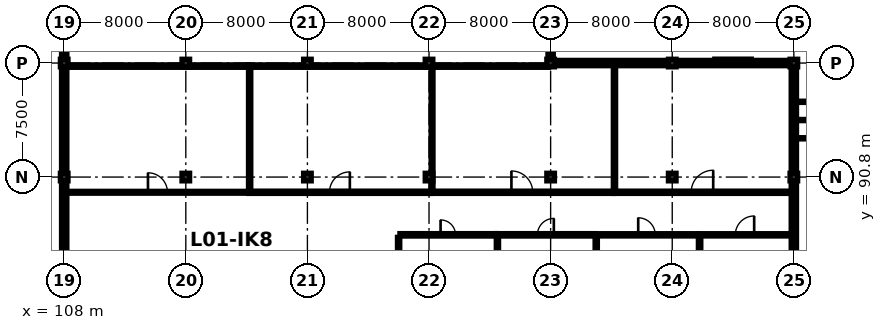
"""IFC4 building model, lengths in metres.
Left out: names, types, materials, properties, quantities, classifications, styles, units other than length and angle.
Written with IfcOpenShell. Run it as: python <this file> out.ifc"""

import sys

from ifc_helpers import new_model, si_unit, direction, frame, frame_2d, origin, origin_2d, place, context, subcontext, project, spatial, rectangle, extrude, element, fill, save


model = new_model("IFC4")
c1 = context("Model", 3, precision=1e-05, world=origin(), true_north=direction((0.0, 1.0)))
c2 = subcontext(c1, "Body", "Model", "MODEL_VIEW")
j1 = project(units=[si_unit("LENGTHUNIT", "METRE"), si_unit("PLANEANGLEUNIT", "RADIAN")], contexts=[c1])
p1 = place(None, origin())
s1 = spatial("IfcSite", under=j1, at=p1, CompositionType="ELEMENT")
p2 = place(p1, origin())
s2 = spatial("IfcBuilding", under=s1, at=p2, CompositionType="ELEMENT")
p3 = place(p2, frame((0.0, 0.0, 5.0)))
s3 = spatial("IfcBuildingStorey", under=s2, at=p3, CompositionType="ELEMENT", Elevation=5.0)
for number, where, z_axis, x_axis in (
    (1, (108.0, 90.8, 0.0), (0.0, 0.0, 1.0), (1.0, 0.0, 0.0)),
    (2, (108.0, 98.3, 0.0), (0.0, 0.0, 1.0), (1.0, 0.0, 0.0)),
    (3, (116.0, 90.8, 0.0), (0.0, 0.0, 1.0), (1.0, 0.0, 0.0)),
    (4, (116.0, 98.3, 0.0), (0.0, 0.0, 1.0), (1.0, 0.0, 0.0)),
    (5, (124.0, 90.8, 0.0), (0.0, 0.0, 1.0), (1.0, 0.0, 0.0)),
    (6, (124.0, 98.3, 0.0), (0.0, 0.0, 1.0), (1.0, 0.0, 0.0)),
    (7, (132.0, 90.8, 0.0), (0.0, 0.0, 1.0), (1.0, 0.0, 0.0)),
    (8, (132.0, 98.3, 0.0), (0.0, 0.0, 1.0), (1.0, 0.0, 0.0)),
    (9, (140.0, 90.8, 0.0), (0.0, 0.0, 1.0), (1.0, 0.0, 0.0)),
    (10, (140.0, 98.3, 0.0), (0.0, 0.0, 1.0), (1.0, 0.0, 0.0)),
    (11, (148.0, 90.8, 0.0), (0.0, 0.0, 1.0), (1.0, 0.0, 0.0)),
    (12, (148.0, 98.3, 0.0), (0.0, 0.0, 1.0), (1.0, 0.0, 0.0)),
    (13, (156.0, 90.8, 0.0), (0.0, 0.0, 1.0), (1.0, 0.0, 0.0)),
    (14, (156.0, 98.3, 0.0), (0.0, 0.0, 1.0), (1.0, 0.0, 0.0)),
):
    element("IfcColumn", number, at=place(p3, frame(where, z_axis=z_axis, x_axis=x_axis)), inside=s3, PredefinedType="COLUMN", context=c2, shape_type="SweptSolid", body=[
        extrude(rectangle(XDim=0.5, YDim=0.5, at=origin_2d()), origin(), (0.0, 0.0, 1.0), 5.5),
    ])
for number, where, z_axis, x_axis in (
    (15, (108.0, 83.55, 0.0), (0.0, 0.0, 1.0), (0.0, 1.0, 0.0)),
    (16, (108.0, 91.05, 0.0), (0.0, 0.0, 1.0), (0.0, 1.0, 0.0)),
):
    element("IfcWall", number, at=place(p3, frame(where, z_axis=z_axis, x_axis=x_axis)), inside=s3, PredefinedType="SOLIDWALL", context=c2, shape_type="SweptSolid", body=[
        extrude(rectangle(XDim=7.0, YDim=0.35, at=frame_2d((3.5, 0.0))), origin(), (0.0, 0.0, 1.0), 4.2),
    ])
p4 = place(p3, frame((108.0, 98.55, 0.0), z_axis=(0.0, 0.0, 1.0), x_axis=(0.0, 1.0, 0.0)))
e17 = element("IfcWall", 17, at=p4, inside=s3, PredefinedType="SOLIDWALL", context=c2, shape_type="SweptSolid", body=[
    extrude(rectangle(XDim=7.0, YDim=0.35, at=frame_2d((3.5, 0.0))), origin(), (0.0, 0.0, 1.0), 4.2),
])
p5 = place(p4, frame((2.6, 0.0, 0.9)))
e18 = element("IfcOpeningElement", 18, at=p5, cuts=e17, PredefinedType="OPENING", context=c2, shape_type="SweptSolid", body=[
    extrude(rectangle(XDim=1.8, YDim=1.3, at=frame_2d((0.9, 0.65))), frame((0.0, 0.187, 0.0), z_axis=(0.0, -1.0, 0.0), x_axis=(1.0, 0.0, 0.0)), (0.0, 0.0, 1.0), 0.374),
])
p6 = place(p3, frame((140.0, 105.55, 0.0), z_axis=(0.0, 0.0, 1.0), x_axis=(0.0, -1.0, 0.0)))
e19 = element("IfcWall", 19, at=p6, inside=s3, PredefinedType="SOLIDWALL", context=c2, shape_type="SweptSolid", body=[
    extrude(rectangle(XDim=7.0, YDim=0.35, at=frame_2d((3.5, 0.0))), origin(), (0.0, 0.0, 1.0), 3.655),
])
p7 = place(p6, frame((2.5, 0.0, 0.9)))
e20 = element("IfcOpeningElement", 20, at=p7, cuts=e19, PredefinedType="OPENING", context=c2, shape_type="SweptSolid", body=[
    extrude(rectangle(XDim=2.0, YDim=1.5, at=frame_2d((1.0, 0.75))), frame((0.0, 0.187, 0.0), z_axis=(0.0, -1.0, 0.0), x_axis=(1.0, 0.0, 0.0)), (0.0, 0.0, 1.0), 0.374),
])
p8 = place(p3, frame((140.25, 98.3, 0.0), z_axis=(0.0, 0.0, 1.0), x_axis=(1.0, 0.0, 0.0)))
e21 = element("IfcWall", 21, at=p8, inside=s3, PredefinedType="SOLIDWALL", context=c2, shape_type="SweptSolid", body=[
    extrude(rectangle(XDim=7.5, YDim=0.35, at=frame_2d((3.75, 0.0))), origin(), (0.0, 0.0, 1.0), 3.655),
])
p9 = place(p3, frame((148.25, 98.3, 0.0), z_axis=(0.0, 0.0, 1.0), x_axis=(1.0, 0.0, 0.0)))
e22 = element("IfcWall", 22, at=p9, inside=s3, PredefinedType="SOLIDWALL", context=c2, shape_type="SweptSolid", body=[
    extrude(rectangle(XDim=7.5, YDim=0.35, at=frame_2d((3.75, 0.0))), origin(), (0.0, 0.0, 1.0), 4.2),
])
p10 = place(p9, frame((2.75, 0.0, 0.9)))
e23 = element("IfcOpeningElement", 23, at=p10, cuts=e22, PredefinedType="OPENING", context=c2, shape_type="SweptSolid", body=[
    extrude(rectangle(XDim=2.0, YDim=1.7, at=frame_2d((1.0, 0.85))), frame((0.0, 0.187, 0.0), z_axis=(0.0, -1.0, 0.0), x_axis=(1.0, 0.0, 0.0)), (0.0, 0.0, 1.0), 0.374),
])
p11 = place(p3, frame((156.0, 98.05, 0.0), z_axis=(0.0, 0.0, 1.0), x_axis=(0.0, -1.0, 0.0)))
e24 = element("IfcWall", 24, at=p11, inside=s3, PredefinedType="SOLIDWALL", context=c2, shape_type="SweptSolid", body=[
    extrude(rectangle(XDim=7.0, YDim=0.35, at=frame_2d((3.5, 0.0))), origin(), (0.0, 0.0, 1.0), 4.2),
])
p12 = place(p11, frame((2.5, 0.0, 0.9)))
e25 = element("IfcOpeningElement", 25, at=p12, cuts=e24, PredefinedType="OPENING", context=c2, shape_type="SweptSolid", body=[
    extrude(rectangle(XDim=2.0, YDim=1.9, at=frame_2d((1.0, 0.95))), frame((0.0, 0.187, 0.0), z_axis=(0.0, -1.0, 0.0), x_axis=(1.0, 0.0, 0.0)), (0.0, 0.0, 1.0), 0.374),
])
p13 = place(p3, frame((156.0, 90.55, 0.0), z_axis=(0.0, 0.0, 1.0), x_axis=(0.0, -1.0, 0.0)))
e26 = element("IfcWall", 26, at=p13, inside=s3, PredefinedType="SOLIDWALL", context=c2, shape_type="SweptSolid", body=[
    extrude(rectangle(XDim=7.0, YDim=0.35, at=frame_2d((3.5, 0.0))), origin(), (0.0, 0.0, 1.0), 4.2),
])
p14 = place(p3, frame((130.085, 87.0, 0.0), z_axis=(0.0, 0.0, 1.0), x_axis=(1.0, 0.0, 0.0)))
e27 = element("IfcWall", 27, at=p14, inside=s3, PredefinedType="PARTITIONING", context=c2, shape_type="SweptSolid", body=[
    extrude(rectangle(XDim=6.33, YDim=0.16, at=frame_2d((3.165, 0.0))), origin(), (0.0, 0.0, 1.0), 4.175),
])
p15 = place(p14, frame((2.675, 0.0, 0.0)))
e28 = element("IfcOpeningElement", 28, at=p15, cuts=e27, PredefinedType="OPENING", context=c2, shape_type="SweptSolid", body=[
    extrude(rectangle(XDim=0.98, YDim=2.12, at=frame_2d((0.49, 1.06))), frame((0.0, 0.092, 0.0), z_axis=(0.0, -1.0, 0.0), x_axis=(1.0, 0.0, 0.0)), (0.0, 0.0, 1.0), 0.184),
])
p16 = place(p3, frame((136.427, 87.0, 0.0), z_axis=(0.0, 0.0, 1.0), x_axis=(1.0, 0.0, 0.0)))
e29 = element("IfcWall", 29, at=p16, inside=s3, PredefinedType="PARTITIONING", context=c2, shape_type="SweptSolid", body=[
    extrude(rectangle(XDim=6.488, YDim=0.16, at=frame_2d((3.244, 0.0))), origin(), (0.0, 0.0, 1.0), 4.175),
])
p17 = place(p16, frame((2.704, 0.0, 0.0)))
e30 = element("IfcOpeningElement", 30, at=p17, cuts=e29, PredefinedType="OPENING", context=c2, shape_type="SweptSolid", body=[
    extrude(rectangle(XDim=1.08, YDim=2.18, at=frame_2d((0.54, 1.09))), frame((0.0, 0.092, 0.0), z_axis=(0.0, -1.0, 0.0), x_axis=(1.0, 0.0, 0.0)), (0.0, 0.0, 1.0), 0.184),
])
p18 = place(p3, frame((142.927, 87.0, 0.0), z_axis=(0.0, 0.0, 1.0), x_axis=(1.0, 0.0, 0.0)))
e31 = element("IfcWall", 31, at=p18, inside=s3, PredefinedType="PARTITIONING", context=c2, shape_type="SweptSolid", body=[
    extrude(rectangle(XDim=6.788, YDim=0.15, at=frame_2d((3.394, 0.0))), origin(), (0.0, 0.0, 1.0), 4.2),
])
p19 = place(p18, frame((2.834, 0.0, 0.0)))
e32 = element("IfcOpeningElement", 32, at=p19, cuts=e31, PredefinedType="OPENING", context=c2, shape_type="SweptSolid", body=[
    extrude(rectangle(XDim=1.12, YDim=2.2, at=frame_2d((0.56, 1.1))), frame((0.0, 0.087, 0.0), z_axis=(0.0, -1.0, 0.0), x_axis=(1.0, 0.0, 0.0)), (0.0, 0.0, 1.0), 0.174),
])
p20 = place(p3, frame((149.727, 87.0, 0.0), z_axis=(0.0, 0.0, 1.0), x_axis=(1.0, 0.0, 0.0)))
e33 = element("IfcWall", 33, at=p20, inside=s3, PredefinedType="PARTITIONING", context=c2, shape_type="SweptSolid", body=[
    extrude(rectangle(XDim=6.086, YDim=0.15, at=frame_2d((3.043, 0.0))), origin(), (0.0, 0.0, 1.0), 4.2),
])
p21 = place(p20, frame((2.423, 0.0, 0.0)))
e34 = element("IfcOpeningElement", 34, at=p21, cuts=e33, PredefinedType="OPENING", context=c2, shape_type="SweptSolid", body=[
    extrude(rectangle(XDim=1.24, YDim=2.2, at=frame_2d((0.62, 1.1))), frame((0.0, 0.087, 0.0), z_axis=(0.0, -1.0, 0.0), x_axis=(1.0, 0.0, 0.0)), (0.0, 0.0, 1.0), 0.174),
])
p22 = place(p3, frame((108.187, 89.8, 0.0), z_axis=(0.0, 0.0, 1.0), x_axis=(1.0, 0.0, 0.0)))
e35 = element("IfcWall", 35, at=p22, inside=s3, PredefinedType="PARTITIONING", context=c2, shape_type="SweptSolid", body=[
    extrude(rectangle(XDim=11.928, YDim=0.125, at=frame_2d((5.964, 0.0))), origin(), (0.0, 0.0, 1.0), 4.2),
])
p23 = place(p22, frame((5.324, 0.0, 0.0)))
e36 = element("IfcOpeningElement", 36, at=p23, cuts=e35, PredefinedType="OPENING", context=c2, shape_type="SweptSolid", body=[
    extrude(rectangle(XDim=1.28, YDim=2.22, at=frame_2d((0.64, 1.11))), frame((0.0, 0.074, 0.0), z_axis=(0.0, -1.0, 0.0), x_axis=(1.0, 0.0, 0.0)), (0.0, 0.0, 1.0), 0.149),
])
p24 = place(p3, frame((120.127, 89.8, 0.0), z_axis=(0.0, 0.0, 1.0), x_axis=(1.0, 0.0, 0.0)))
e37 = element("IfcWall", 37, at=p24, inside=s3, PredefinedType="PARTITIONING", context=c2, shape_type="SweptSolid", body=[
    extrude(rectangle(XDim=11.988, YDim=0.15, at=frame_2d((5.994, 0.0))), origin(), (0.0, 0.0, 1.0), 4.2),
])
p25 = place(p24, frame((5.324, 0.0, 0.0)))
e38 = element("IfcOpeningElement", 38, at=p25, cuts=e37, PredefinedType="OPENING", context=c2, shape_type="SweptSolid", body=[
    extrude(rectangle(XDim=1.34, YDim=2.24, at=frame_2d((0.67, 1.12))), frame((0.0, 0.087, 0.0), z_axis=(0.0, -1.0, 0.0), x_axis=(1.0, 0.0, 0.0)), (0.0, 0.0, 1.0), 0.174),
])
p26 = place(p3, frame((132.127, 89.8, 0.0), z_axis=(0.0, 0.0, 1.0), x_axis=(1.0, 0.0, 0.0)))
e39 = element("IfcWall", 39, at=p26, inside=s3, PredefinedType="PARTITIONING", context=c2, shape_type="SweptSolid", body=[
    extrude(rectangle(XDim=11.988, YDim=0.15, at=frame_2d((5.994, 0.0))), origin(), (0.0, 0.0, 1.0), 4.2),
])
p27 = place(p26, frame((5.294, 0.0, 0.0)))
e40 = element("IfcOpeningElement", 40, at=p27, cuts=e39, PredefinedType="OPENING", context=c2, shape_type="SweptSolid", body=[
    extrude(rectangle(XDim=1.4, YDim=2.25, at=frame_2d((0.7, 1.125))), frame((0.0, 0.087, 0.0), z_axis=(0.0, -1.0, 0.0), x_axis=(1.0, 0.0, 0.0)), (0.0, 0.0, 1.0), 0.174),
])
p28 = place(p3, frame((144.127, 89.8, 0.0), z_axis=(0.0, 0.0, 1.0), x_axis=(1.0, 0.0, 0.0)))
e41 = element("IfcWall", 41, at=p28, inside=s3, PredefinedType="PARTITIONING", context=c2, shape_type="SweptSolid", body=[
    extrude(rectangle(XDim=11.686, YDim=0.15, at=frame_2d((5.843, 0.0))), origin(), (0.0, 0.0, 1.0), 4.2),
])
p29 = place(p28, frame((5.118, 0.0, 0.0)))
e42 = element("IfcOpeningElement", 42, at=p29, cuts=e41, PredefinedType="OPENING", context=c2, shape_type="SweptSolid", body=[
    extrude(rectangle(XDim=1.45, YDim=2.26, at=frame_2d((0.725, 1.13))), frame((0.0, 0.087, 0.0), z_axis=(0.0, -1.0, 0.0), x_axis=(1.0, 0.0, 0.0)), (0.0, 0.0, 1.0), 0.174),
])
p30 = place(p3, frame((108.262, 98.1, 0.0), z_axis=(0.0, 0.0, 1.0), x_axis=(1.0, 0.0, 0.0)))
e43 = element("IfcWall", 43, at=p30, inside=s3, PredefinedType="PARTITIONING", context=c2, shape_type="SweptSolid", body=[
    extrude(rectangle(XDim=11.853, YDim=0.16, at=frame_2d((5.927, 0.0))), origin(), (0.0, 0.0, 1.0), 4.2),
])
p31 = place(p3, frame((120.127, 98.1, 0.0), z_axis=(0.0, 0.0, 1.0), x_axis=(1.0, 0.0, 0.0)))
e44 = element("IfcWall", 44, at=p31, inside=s3, PredefinedType="PARTITIONING", context=c2, shape_type="SweptSolid", body=[
    extrude(rectangle(XDim=11.821, YDim=0.16, at=frame_2d((5.911, 0.0))), origin(), (0.0, 0.0, 1.0), 3.655),
])
p32 = place(p3, frame((132.262, 98.1, 0.0), z_axis=(0.0, 0.0, 1.0), x_axis=(1.0, 0.0, 0.0)))
e45 = element("IfcWall", 45, at=p32, inside=s3, PredefinedType="PARTITIONING", context=c2, shape_type="SweptSolid", body=[
    extrude(rectangle(XDim=7.604, YDim=0.16, at=frame_2d((3.802, 0.0))), origin(), (0.0, 0.0, 1.0), 3.655),
])
p33 = place(p3, frame((130.0, 75.987, 0.0), z_axis=(0.0, 0.0, 1.0), x_axis=(0.0, 1.0, 0.0)))
e46 = element("IfcWall", 46, at=p33, inside=s3, PredefinedType="PARTITIONING", context=c2, shape_type="SweptSolid", body=[
    extrude(rectangle(XDim=10.848, YDim=0.15, at=frame_2d((5.424, 0.0))), origin(), (0.0, 0.0, 1.0), 4.2),
])
p34 = place(p3, frame((136.5, 75.987, 0.0), z_axis=(0.0, 0.0, 1.0), x_axis=(0.0, 1.0, 0.0)))
e47 = element("IfcWall", 47, at=p34, inside=s3, PredefinedType="PARTITIONING", context=c2, shape_type="SweptSolid", body=[
    extrude(rectangle(XDim=10.921, YDim=0.15, at=frame_2d((5.46, 0.0))), origin(), (0.0, 0.0, 1.0), 4.2),
])
p35 = place(p3, frame((143.0, 75.987, 0.0), z_axis=(0.0, 0.0, 1.0), x_axis=(0.0, 1.0, 0.0)))
e48 = element("IfcWall", 48, at=p35, inside=s3, PredefinedType="PARTITIONING", context=c2, shape_type="SweptSolid", body=[
    extrude(rectangle(XDim=10.926, YDim=0.15, at=frame_2d((5.463, 0.0))), origin(), (0.0, 0.0, 1.0), 4.2),
])
p36 = place(p3, frame((149.8, 75.987, 0.0), z_axis=(0.0, 0.0, 1.0), x_axis=(0.0, 1.0, 0.0)))
e49 = element("IfcWall", 49, at=p36, inside=s3, PredefinedType="PARTITIONING", context=c2, shape_type="SweptSolid", body=[
    extrude(rectangle(XDim=10.926, YDim=0.16, at=frame_2d((5.463, 0.0))), origin(), (0.0, 0.0, 1.0), 4.2),
])
p37 = place(p3, frame((120.2, 89.887, 0.0), z_axis=(0.0, 0.0, 1.0), x_axis=(0.0, 1.0, 0.0)))
e50 = element("IfcWall", 50, at=p37, inside=s3, PredefinedType="PARTITIONING", context=c2, shape_type="SweptSolid", body=[
    extrude(rectangle(XDim=8.121, YDim=0.15, at=frame_2d((4.061, 0.0))), origin(), (0.0, 0.0, 1.0), 4.2),
])
p38 = place(p3, frame((132.2, 89.887, 0.0), z_axis=(0.0, 0.0, 1.0), x_axis=(0.0, 1.0, 0.0)))
e51 = element("IfcWall", 51, at=p38, inside=s3, PredefinedType="PARTITIONING", context=c2, shape_type="SweptSolid", body=[
    extrude(rectangle(XDim=8.151, YDim=0.125, at=frame_2d((4.076, 0.0))), origin(), (0.0, 0.0, 1.0), 3.655),
])
p39 = place(p3, frame((144.2, 89.887, 0.0), z_axis=(0.0, 0.0, 1.0), x_axis=(0.0, 1.0, 0.0)))
e52 = element("IfcWall", 52, at=p39, inside=s3, PredefinedType="PARTITIONING", context=c2, shape_type="SweptSolid", body=[
    extrude(rectangle(XDim=8.226, YDim=0.15, at=frame_2d((4.113, 0.0))), origin(), (0.0, 0.0, 1.0), 4.2),
])
p40 = place(p10, origin())
e53 = element("IfcWindow", 53, at=p40, inside=s3, PartitioningType="DOUBLE_PANEL_VERTICAL", PredefinedType="WINDOW", context=c2, shape_type="SweptSolid", body=[
    extrude(rectangle(XDim=2.0, YDim=1.7, at=frame_2d((1.0, 0.85))), frame((0.0, 0.03, 0.0), z_axis=(0.0, -1.0, 0.0), x_axis=(1.0, 0.0, 0.0)), (0.0, 0.0, 1.0), 0.06),
])
fill(e23, e53)
p41 = place(p12, origin())
e54 = element("IfcWindow", 54, at=p41, inside=s3, PartitioningType="DOUBLE_PANEL_VERTICAL", PredefinedType="WINDOW", context=c2, shape_type="SweptSolid", body=[
    extrude(rectangle(XDim=2.0, YDim=1.9, at=frame_2d((1.0, 0.95))), frame((0.0, 0.03, 0.0), z_axis=(0.0, -1.0, 0.0), x_axis=(1.0, 0.0, 0.0)), (0.0, 0.0, 1.0), 0.06),
])
fill(e25, e54)
p42 = place(p15, origin())
e55 = element("IfcDoor", 55, at=p42, inside=s3, OperationType="SINGLE_SWING_LEFT", PredefinedType="DOOR", context=c2, shape_type="SweptSolid", body=[
    extrude(rectangle(XDim=0.98, YDim=2.12, at=frame_2d((0.49, 1.06))), frame((0.0, 0.025, 0.0), z_axis=(0.0, -1.0, 0.0), x_axis=(1.0, 0.0, 0.0)), (0.0, 0.0, 1.0), 0.05),
])
fill(e28, e55)
p43 = place(p17, origin())
e56 = element("IfcDoor", 56, at=p43, inside=s3, OperationType="SINGLE_SWING_RIGHT", PredefinedType="DOOR", context=c2, shape_type="SweptSolid", body=[
    extrude(rectangle(XDim=1.08, YDim=2.18, at=frame_2d((0.54, 1.09))), frame((0.0, 0.025, 0.0), z_axis=(0.0, -1.0, 0.0), x_axis=(1.0, 0.0, 0.0)), (0.0, 0.0, 1.0), 0.05),
])
fill(e30, e56)
p44 = place(p19, origin())
e57 = element("IfcDoor", 57, at=p44, inside=s3, OperationType="SINGLE_SWING_LEFT", PredefinedType="DOOR", context=c2, shape_type="SweptSolid", body=[
    extrude(rectangle(XDim=1.12, YDim=2.2, at=frame_2d((0.56, 1.1))), frame((0.0, 0.025, 0.0), z_axis=(0.0, -1.0, 0.0), x_axis=(1.0, 0.0, 0.0)), (0.0, 0.0, 1.0), 0.05),
])
fill(e32, e57)
p45 = place(p21, origin())
e58 = element("IfcDoor", 58, at=p45, inside=s3, OperationType="SINGLE_SWING_RIGHT", PredefinedType="DOOR", context=c2, shape_type="SweptSolid", body=[
    extrude(rectangle(XDim=1.24, YDim=2.2, at=frame_2d((0.62, 1.1))), frame((0.0, 0.025, 0.0), z_axis=(0.0, -1.0, 0.0), x_axis=(1.0, 0.0, 0.0)), (0.0, 0.0, 1.0), 0.05),
])
fill(e34, e58)
p46 = place(p23, origin())
e59 = element("IfcDoor", 59, at=p46, inside=s3, OperationType="SINGLE_SWING_LEFT", PredefinedType="DOOR", context=c2, shape_type="SweptSolid", body=[
    extrude(rectangle(XDim=1.28, YDim=2.22, at=frame_2d((0.64, 1.11))), frame((0.0, 0.025, 0.0), z_axis=(0.0, -1.0, 0.0), x_axis=(1.0, 0.0, 0.0)), (0.0, 0.0, 1.0), 0.05),
])
fill(e36, e59)
p47 = place(p25, origin())
e60 = element("IfcDoor", 60, at=p47, inside=s3, OperationType="SINGLE_SWING_RIGHT", PredefinedType="DOOR", context=c2, shape_type="SweptSolid", body=[
    extrude(rectangle(XDim=1.34, YDim=2.24, at=frame_2d((0.67, 1.12))), frame((0.0, 0.025, 0.0), z_axis=(0.0, -1.0, 0.0), x_axis=(1.0, 0.0, 0.0)), (0.0, 0.0, 1.0), 0.05),
])
fill(e38, e60)
p48 = place(p27, origin())
e61 = element("IfcDoor", 61, at=p48, inside=s3, OperationType="SINGLE_SWING_LEFT", PredefinedType="DOOR", context=c2, shape_type="SweptSolid", body=[
    extrude(rectangle(XDim=1.4, YDim=2.25, at=frame_2d((0.7, 1.125))), frame((0.0, 0.025, 0.0), z_axis=(0.0, -1.0, 0.0), x_axis=(1.0, 0.0, 0.0)), (0.0, 0.0, 1.0), 0.05),
])
fill(e40, e61)
p49 = place(p29, origin())
e62 = element("IfcDoor", 62, at=p49, inside=s3, OperationType="SINGLE_SWING_RIGHT", PredefinedType="DOOR", context=c2, shape_type="SweptSolid", body=[
    extrude(rectangle(XDim=1.45, YDim=2.26, at=frame_2d((0.725, 1.13))), frame((0.0, 0.025, 0.0), z_axis=(0.0, -1.0, 0.0), x_axis=(1.0, 0.0, 0.0)), (0.0, 0.0, 1.0), 0.05),
])
fill(e42, e62)
save(model, sys.argv[1])
